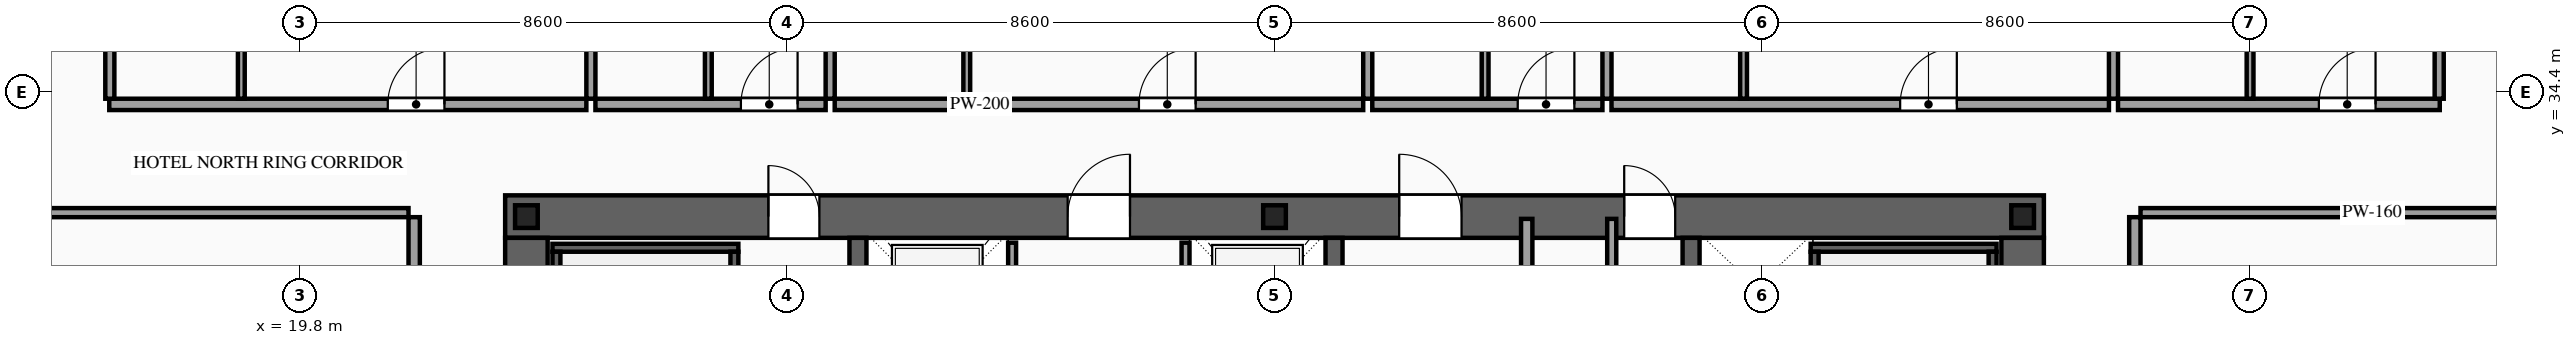
"""IFC4 building model, lengths in metres.
Left out: names, types, materials, properties, quantities, classifications, styles, units other than length and angle.
Written with IfcOpenShell. Run it as: python <this file> out.ifc"""

import sys

from ifc_helpers import new_model, si_unit, direction, frame, frame_2d, origin, origin_2d, place, context, subcontext, project, spatial, rectangle, i_section, extrude, source, transform, mapped, element, fill, save


model = new_model("IFC4")
c1 = context("Model", 3, precision=1e-05, world=origin(), true_north=direction((0.0, 1.0)))
c2 = subcontext(c1, "Body", "Model", "MODEL_VIEW")
j1 = project(units=[si_unit("LENGTHUNIT", "METRE"), si_unit("PLANEANGLEUNIT", "RADIAN")], contexts=[c1])
p1 = place(None, origin())
s1 = spatial("IfcSite", under=j1, at=p1, CompositionType="ELEMENT")
p2 = place(p1, origin())
s2 = spatial("IfcBuilding", under=s1, at=p2, CompositionType="ELEMENT")
p3 = place(p2, frame((0.0, 0.0, 145.2)))
s3 = spatial("IfcBuildingStorey", under=s2, at=p3, CompositionType="ELEMENT", Elevation=145.2)
p4 = place(p3, frame((23.425, 32.2, 0.0), z_axis=(0.0, 0.0, 1.0), x_axis=(1.0, 0.0, 0.0)))
e1 = element("IfcWall", 1, at=p4, inside=s3, PredefinedType="SHEAR", context=c2, shape_type="SweptSolid", body=[
    extrude(rectangle(XDim=27.15, YDim=0.75, at=frame_2d((13.575, 0.0))), origin(), (0.0, 0.0, 1.0), 3.6),
])
p5 = place(p4, frame((4.645, 0.0, 0.0)))
e2 = element("IfcOpeningElement", 2, at=p5, cuts=e1, PredefinedType="OPENING", context=c2, shape_type="SweptSolid", body=[
    extrude(rectangle(XDim=0.9, YDim=2.15, at=frame_2d((0.45, 1.075))), frame((0.0, 0.39, 0.0), z_axis=(0.0, -1.0, 0.0), x_axis=(1.0, 0.0, 0.0)), (0.0, 0.0, 1.0), 0.78),
])
p6 = place(p4, frame((9.925, 0.0, 0.0)))
e3 = element("IfcOpeningElement", 3, at=p6, cuts=e1, PredefinedType="OPENING", context=c2, shape_type="SweptSolid", body=[
    extrude(rectangle(XDim=1.1, YDim=2.2, at=frame_2d((0.55, 1.1))), frame((0.0, 0.39, 0.0), z_axis=(0.0, -1.0, 0.0), x_axis=(1.0, 0.0, 0.0)), (0.0, 0.0, 1.0), 0.78),
])
p7 = place(p4, frame((15.775, 0.0, 0.0)))
e4 = element("IfcOpeningElement", 4, at=p7, cuts=e1, PredefinedType="OPENING", context=c2, shape_type="SweptSolid", body=[
    extrude(rectangle(XDim=1.1, YDim=2.2, at=frame_2d((0.55, 1.1))), frame((0.0, 0.39, 0.0), z_axis=(0.0, -1.0, 0.0), x_axis=(1.0, 0.0, 0.0)), (0.0, 0.0, 1.0), 0.78),
])
p8 = place(p4, frame((19.745, 0.0, 0.0)))
e5 = element("IfcOpeningElement", 5, at=p8, cuts=e1, PredefinedType="OPENING", context=c2, shape_type="SweptSolid", body=[
    extrude(rectangle(XDim=0.9, YDim=2.15, at=frame_2d((0.45, 1.075))), frame((0.0, 0.39, 0.0), z_axis=(0.0, -1.0, 0.0), x_axis=(1.0, 0.0, 0.0)), (0.0, 0.0, 1.0), 0.78),
])
m1 = source(origin(), c2, "Body", "SweptSolid", [
    extrude(rectangle(XDim=12.05, YDim=0.75, at=frame_2d((6.025, 0.0))), origin(), (0.0, 0.0, 1.0), 3.6),
])
for number, where, z_axis, x_axis in (
    (6, (23.8, 19.775, 0.0), (0.0, 0.0, 1.0), (0.0, 1.0, 0.0)),
    (7, (50.2, 19.775, 0.0), (0.0, 0.0, 1.0), (0.0, 1.0, 0.0)),
):
    element("IfcWall", number, at=place(p3, frame(where, z_axis=z_axis, x_axis=x_axis)), inside=s3, PredefinedType="SHEAR", context=c2, shape_type="MappedRepresentation", body=[
        mapped(m1, transform((0.0, 0.0, 0.0), scale=1.0)),
    ])
m2 = source(origin(), c2, "Body", "SweptSolid", [
    extrude(rectangle(XDim=12.05, YDim=0.3, at=frame_2d((6.025, 0.0))), origin(), (0.0, 0.0, 1.0), 3.6),
])
for number, where, z_axis, x_axis in (
    (8, (29.65, 19.775, 0.0), (0.0, 0.0, 1.0), (0.0, 1.0, 0.0)),
    (9, (38.05, 19.775, 0.0), (0.0, 0.0, 1.0), (0.0, 1.0, 0.0)),
    (10, (44.35, 19.775, 0.0), (0.0, 0.0, 1.0), (0.0, 1.0, 0.0)),
):
    element("IfcWall", number, at=place(p3, frame(where, z_axis=z_axis, x_axis=x_axis)), inside=s3, PredefinedType="SOLIDWALL", context=c2, shape_type="MappedRepresentation", body=[
        mapped(m2, transform((0.0, 0.0, 0.0), scale=1.0)),
    ])
m3 = source(origin(), c2, "Body", "SweptSolid", [
    extrude(i_section(OverallWidth=0.4, OverallDepth=0.4, WebThickness=0.013, FlangeThickness=0.021, at=origin_2d()), origin(), (0.0, 0.0, 1.0), 3.6),
])
for number, where, z_axis, x_axis in (
    (11, (23.8, 32.2, 0.0), (0.0, 0.0, 1.0), (1.0, 0.0, 0.0)),
    (12, (37.0, 32.2, 0.0), (0.0, 0.0, 1.0), (1.0, 0.0, 0.0)),
    (13, (50.2, 32.2, 0.0), (0.0, 0.0, 1.0), (1.0, 0.0, 0.0)),
):
    element("IfcColumn", number, at=place(p3, frame(where, z_axis=z_axis, x_axis=x_axis)), inside=s3, PredefinedType="COLUMN", context=c2, shape_type="MappedRepresentation", body=[
        mapped(m3, transform((0.0, 0.0, 0.0), scale=1.0)),
    ])
p9 = place(p3, frame((32.37, 29.4, 0.0), z_axis=(0.0, 0.0, 1.0), x_axis=(0.0, 1.0, 0.0)))
e14 = element("IfcWall", 14, at=p9, inside=s3, PredefinedType="SOLIDWALL", context=c2, shape_type="SweptSolid", body=[
    extrude(rectangle(XDim=2.34, YDim=0.14, at=frame_2d((1.17, 0.0))), origin(), (0.0, 0.0, 1.0), 3.38),
])
p10 = place(p9, frame((0.62, 0.0, 0.0)))
e15 = element("IfcOpeningElement", 15, at=p10, cuts=e14, PredefinedType="OPENING", context=c2, shape_type="SweptSolid", body=[
    extrude(rectangle(XDim=1.1, YDim=2.2, at=frame_2d((0.55, 1.1))), frame((0.0, 0.085, 0.0), z_axis=(0.0, -1.0, 0.0), x_axis=(1.0, 0.0, 0.0)), (0.0, 0.0, 1.0), 0.17),
])
p11 = place(p3, frame((35.43, 29.4, 0.0), z_axis=(0.0, 0.0, 1.0), x_axis=(0.0, 1.0, 0.0)))
e16 = element("IfcWall", 16, at=p11, inside=s3, PredefinedType="SOLIDWALL", context=c2, shape_type="SweptSolid", body=[
    extrude(rectangle(XDim=2.34, YDim=0.14, at=frame_2d((1.17, 0.0))), origin(), (0.0, 0.0, 1.0), 3.38),
])
p12 = place(p11, frame((0.62, 0.0, 0.0)))
e17 = element("IfcOpeningElement", 17, at=p12, cuts=e16, PredefinedType="OPENING", context=c2, shape_type="SweptSolid", body=[
    extrude(rectangle(XDim=1.1, YDim=2.2, at=frame_2d((0.55, 1.1))), frame((0.0, 0.085, 0.0), z_axis=(0.0, -1.0, 0.0), x_axis=(1.0, 0.0, 0.0)), (0.0, 0.0, 1.0), 0.17),
])
m4 = source(origin(), c2, "Body", "SweptSolid", [
    extrude(rectangle(XDim=3.28, YDim=0.14, at=frame_2d((1.64, 0.0))), origin(), (0.0, 0.0, 1.0), 3.38),
])
p13 = place(p3, frame((24.26, 31.65, 0.0), z_axis=(0.0, 0.0, 1.0), x_axis=(1.0, 0.0, 0.0)))
e18 = element("IfcWall", 18, at=p13, inside=s3, PredefinedType="SOLIDWALL", context=c2, shape_type="MappedRepresentation", body=[
    mapped(m4, transform((0.0, 0.0, 0.0), scale=1.0)),
])
m5 = source(origin(), c2, "Body", "SweptSolid", [
    extrude(rectangle(XDim=8.94, YDim=0.14, at=frame_2d((4.47, 0.0))), origin(), (0.0, 0.0, 1.0), 3.38),
])
for number, where, z_axis, x_axis in (
    (19, (24.33, 22.64, 0.0), (0.0, 0.0, 1.0), (0.0, 1.0, 0.0)),
    (20, (27.47, 22.64, 0.0), (0.0, 0.0, 1.0), (0.0, 1.0, 0.0)),
):
    element("IfcWall", number, at=place(p3, frame(where, z_axis=z_axis, x_axis=x_axis)), inside=s3, PredefinedType="SOLIDWALL", context=c2, shape_type="MappedRepresentation", body=[
        mapped(m5, transform((0.0, 0.0, 0.0), scale=1.0)),
    ])
p14 = place(p3, frame((46.46, 31.65, 0.0), z_axis=(0.0, 0.0, 1.0), x_axis=(1.0, 0.0, 0.0)))
e21 = element("IfcWall", 21, at=p14, inside=s3, PredefinedType="SOLIDWALL", context=c2, shape_type="MappedRepresentation", body=[
    mapped(m4, transform((0.0, 0.0, 0.0), scale=1.0)),
])
for number, where, z_axis, x_axis in (
    (22, (46.53, 22.64, 0.0), (0.0, 0.0, 1.0), (0.0, 1.0, 0.0)),
    (23, (49.67, 22.64, 0.0), (0.0, 0.0, 1.0), (0.0, 1.0, 0.0)),
):
    element("IfcWall", number, at=place(p3, frame(where, z_axis=z_axis, x_axis=x_axis)), inside=s3, PredefinedType="SOLIDWALL", context=c2, shape_type="MappedRepresentation", body=[
        mapped(m5, transform((0.0, 0.0, 0.0), scale=1.0)),
    ])
m6 = source(origin(), c2, "Body", "SweptSolid", [
    extrude(rectangle(XDim=12.72, YDim=0.2, at=frame_2d((6.36, 0.0))), origin(), (0.0, 0.0, 1.0), 3.38),
])
p15 = place(p3, frame((41.45, 19.44, 0.0), z_axis=(0.0, 0.0, 1.0), x_axis=(0.0, 1.0, 0.0)))
e24 = element("IfcWall", 24, at=p15, inside=s3, PredefinedType="PARTITIONING", context=c2, shape_type="MappedRepresentation", body=[
    mapped(m6, transform((0.0, 0.0, 0.0), scale=1.0)),
])
m7 = source(origin(), c2, "Body", "SweptSolid", [
    extrude(rectangle(XDim=10.72, YDim=0.16, at=frame_2d((5.36, 0.0))), origin(), (0.0, 0.0, 1.0), 3.38),
])
p16 = place(p3, frame((42.95, 21.44, 0.0), z_axis=(0.0, 0.0, 1.0), x_axis=(0.0, 1.0, 0.0)))
e25 = element("IfcWall", 25, at=p16, inside=s3, PredefinedType="PARTITIONING", context=c2, shape_type="MappedRepresentation", body=[
    mapped(m7, transform((0.0, 0.0, 0.0), scale=1.0)),
])
p17 = place(p3, frame((16.44, 34.18, 0.0), z_axis=(0.0, 0.0, 1.0), x_axis=(1.0, 0.0, 0.0)))
e26 = element("IfcWall", 26, at=p17, inside=s3, PredefinedType="PARTITIONING", context=c2, shape_type="SweptSolid", body=[
    extrude(rectangle(XDim=8.418, YDim=0.2, at=frame_2d((4.209, 0.0))), origin(), (0.0, 0.0, 1.0), 3.38),
])
p18 = place(p17, frame((4.914, 0.0, 0.0)))
e27 = element("IfcOpeningElement", 27, at=p18, cuts=e26, PredefinedType="OPENING", context=c2, shape_type="SweptSolid", body=[
    extrude(rectangle(XDim=1.0, YDim=2.2, at=frame_2d((0.5, 1.1))), frame((0.0, 0.115, 0.0), z_axis=(0.0, -1.0, 0.0), x_axis=(1.0, 0.0, 0.0)), (0.0, 0.0, 1.0), 0.23),
])
m8 = source(origin(), c2, "Body", "SweptSolid", [
    extrude(rectangle(XDim=14.97, YDim=0.16, at=frame_2d((7.485, 0.0))), origin(), (0.0, 0.0, 1.0), 3.38),
])
p19 = place(p3, frame((24.938, 34.28, 0.0), z_axis=(0.0, 0.0, 1.0), x_axis=(0.0, 1.0, 0.0)))
e28 = element("IfcWall", 28, at=p19, inside=s3, PredefinedType="PARTITIONING", context=c2, shape_type="MappedRepresentation", body=[
    mapped(m8, transform((0.0, 0.0, 0.0), scale=1.0)),
])
m9 = source(origin(), c2, "Body", "SweptSolid", [
    extrude(rectangle(XDim=2.42, YDim=0.12, at=frame_2d((1.21, 0.0))), origin(), (0.0, 0.0, 1.0), 3.38),
])
p20 = place(p3, frame((18.77, 34.28, 0.0), z_axis=(0.0, 0.0, 1.0), x_axis=(0.0, 1.0, 0.0)))
e29 = element("IfcWall", 29, at=p20, inside=s3, PredefinedType="PARTITIONING", context=c2, shape_type="MappedRepresentation", body=[
    mapped(m9, transform((0.0, 0.0, 0.0), scale=1.0)),
])
p21 = place(p3, frame((25.018, 34.18, 0.0), z_axis=(0.0, 0.0, 1.0), x_axis=(1.0, 0.0, 0.0)))
e30 = element("IfcWall", 30, at=p21, inside=s3, PredefinedType="PARTITIONING", context=c2, shape_type="SweptSolid", body=[
    extrude(rectangle(XDim=4.062, YDim=0.2, at=frame_2d((2.031, 0.0))), origin(), (0.0, 0.0, 1.0), 3.38),
])
p22 = place(p21, frame((2.567, 0.0, 0.0)))
e31 = element("IfcOpeningElement", 31, at=p22, cuts=e30, PredefinedType="OPENING", context=c2, shape_type="SweptSolid", body=[
    extrude(rectangle(XDim=1.0, YDim=2.2, at=frame_2d((0.5, 1.1))), frame((0.0, 0.115, 0.0), z_axis=(0.0, -1.0, 0.0), x_axis=(1.0, 0.0, 0.0)), (0.0, 0.0, 1.0), 0.23),
])
p23 = place(p3, frame((29.16, 34.28, 0.0), z_axis=(0.0, 0.0, 1.0), x_axis=(0.0, 1.0, 0.0)))
e32 = element("IfcWall", 32, at=p23, inside=s3, PredefinedType="PARTITIONING", context=c2, shape_type="MappedRepresentation", body=[
    mapped(m8, transform((0.0, 0.0, 0.0), scale=1.0)),
])
p24 = place(p3, frame((27.01, 34.28, 0.0), z_axis=(0.0, 0.0, 1.0), x_axis=(0.0, 1.0, 0.0)))
e33 = element("IfcWall", 33, at=p24, inside=s3, PredefinedType="PARTITIONING", context=c2, shape_type="MappedRepresentation", body=[
    mapped(m9, transform((0.0, 0.0, 0.0), scale=1.0)),
])
p25 = place(p3, frame((29.24, 34.18, 0.0), z_axis=(0.0, 0.0, 1.0), x_axis=(1.0, 0.0, 0.0)))
e34 = element("IfcWall", 34, at=p25, inside=s3, PredefinedType="PARTITIONING", context=c2, shape_type="SweptSolid", body=[
    extrude(rectangle(XDim=9.325, YDim=0.2, at=frame_2d((4.663, 0.0))), origin(), (0.0, 0.0, 1.0), 3.38),
])
p26 = place(p25, frame((5.368, 0.0, 0.0)))
e35 = element("IfcOpeningElement", 35, at=p26, cuts=e34, PredefinedType="OPENING", context=c2, shape_type="SweptSolid", body=[
    extrude(rectangle(XDim=1.0, YDim=2.2, at=frame_2d((0.5, 1.1))), frame((0.0, 0.115, 0.0), z_axis=(0.0, -1.0, 0.0), x_axis=(1.0, 0.0, 0.0)), (0.0, 0.0, 1.0), 0.23),
])
p27 = place(p3, frame((38.645, 34.28, 0.0), z_axis=(0.0, 0.0, 1.0), x_axis=(0.0, 1.0, 0.0)))
e36 = element("IfcWall", 36, at=p27, inside=s3, PredefinedType="PARTITIONING", context=c2, shape_type="MappedRepresentation", body=[
    mapped(m8, transform((0.0, 0.0, 0.0), scale=1.0)),
])
p28 = place(p3, frame((31.57, 34.28, 0.0), z_axis=(0.0, 0.0, 1.0), x_axis=(0.0, 1.0, 0.0)))
e37 = element("IfcWall", 37, at=p28, inside=s3, PredefinedType="PARTITIONING", context=c2, shape_type="MappedRepresentation", body=[
    mapped(m9, transform((0.0, 0.0, 0.0), scale=1.0)),
])
p29 = place(p3, frame((38.725, 34.18, 0.0), z_axis=(0.0, 0.0, 1.0), x_axis=(1.0, 0.0, 0.0)))
e38 = element("IfcWall", 38, at=p29, inside=s3, PredefinedType="PARTITIONING", context=c2, shape_type="SweptSolid", body=[
    extrude(rectangle(XDim=4.061, YDim=0.2, at=frame_2d((2.03, 0.0))), origin(), (0.0, 0.0, 1.0), 3.38),
])
p30 = place(p29, frame((2.566, 0.0, 0.0)))
e39 = element("IfcOpeningElement", 39, at=p30, cuts=e38, PredefinedType="OPENING", context=c2, shape_type="SweptSolid", body=[
    extrude(rectangle(XDim=1.0, YDim=2.2, at=frame_2d((0.5, 1.1))), frame((0.0, 0.115, 0.0), z_axis=(0.0, -1.0, 0.0), x_axis=(1.0, 0.0, 0.0)), (0.0, 0.0, 1.0), 0.23),
])
p31 = place(p3, frame((42.866, 34.28, 0.0), z_axis=(0.0, 0.0, 1.0), x_axis=(0.0, 1.0, 0.0)))
e40 = element("IfcWall", 40, at=p31, inside=s3, PredefinedType="PARTITIONING", context=c2, shape_type="MappedRepresentation", body=[
    mapped(m8, transform((0.0, 0.0, 0.0), scale=1.0)),
])
p32 = place(p3, frame((40.716, 34.28, 0.0), z_axis=(0.0, 0.0, 1.0), x_axis=(0.0, 1.0, 0.0)))
e41 = element("IfcWall", 41, at=p32, inside=s3, PredefinedType="PARTITIONING", context=c2, shape_type="MappedRepresentation", body=[
    mapped(m9, transform((0.0, 0.0, 0.0), scale=1.0)),
])
p33 = place(p3, frame((42.946, 34.18, 0.0), z_axis=(0.0, 0.0, 1.0), x_axis=(1.0, 0.0, 0.0)))
e42 = element("IfcWall", 42, at=p33, inside=s3, PredefinedType="PARTITIONING", context=c2, shape_type="SweptSolid", body=[
    extrude(rectangle(XDim=8.777, YDim=0.2, at=frame_2d((4.388, 0.0))), origin(), (0.0, 0.0, 1.0), 3.38),
])
p34 = place(p33, frame((5.093, 0.0, 0.0)))
e43 = element("IfcOpeningElement", 43, at=p34, cuts=e42, PredefinedType="OPENING", context=c2, shape_type="SweptSolid", body=[
    extrude(rectangle(XDim=1.0, YDim=2.2, at=frame_2d((0.5, 1.1))), frame((0.0, 0.115, 0.0), z_axis=(0.0, -1.0, 0.0), x_axis=(1.0, 0.0, 0.0)), (0.0, 0.0, 1.0), 0.23),
])
p35 = place(p3, frame((51.803, 34.28, 0.0), z_axis=(0.0, 0.0, 1.0), x_axis=(0.0, 1.0, 0.0)))
e44 = element("IfcWall", 44, at=p35, inside=s3, PredefinedType="PARTITIONING", context=c2, shape_type="MappedRepresentation", body=[
    mapped(m8, transform((0.0, 0.0, 0.0), scale=1.0)),
])
p36 = place(p3, frame((45.276, 34.28, 0.0), z_axis=(0.0, 0.0, 1.0), x_axis=(0.0, 1.0, 0.0)))
e45 = element("IfcWall", 45, at=p36, inside=s3, PredefinedType="PARTITIONING", context=c2, shape_type="MappedRepresentation", body=[
    mapped(m9, transform((0.0, 0.0, 0.0), scale=1.0)),
])
p37 = place(p3, frame((51.883, 34.18, 0.0), z_axis=(0.0, 0.0, 1.0), x_axis=(1.0, 0.0, 0.0)))
e46 = element("IfcWall", 46, at=p37, inside=s3, PredefinedType="PARTITIONING", context=c2, shape_type="SweptSolid", body=[
    extrude(rectangle(XDim=5.677, YDim=0.2, at=frame_2d((2.838, 0.0))), origin(), (0.0, 0.0, 1.0), 3.38),
])
p38 = place(p37, frame((3.544, 0.0, 0.0)))
e47 = element("IfcOpeningElement", 47, at=p38, cuts=e46, PredefinedType="OPENING", context=c2, shape_type="SweptSolid", body=[
    extrude(rectangle(XDim=1.0, YDim=2.2, at=frame_2d((0.5, 1.1))), frame((0.0, 0.115, 0.0), z_axis=(0.0, -1.0, 0.0), x_axis=(1.0, 0.0, 0.0)), (0.0, 0.0, 1.0), 0.23),
])
m10 = source(origin(), c2, "Body", "SweptSolid", [
    extrude(rectangle(XDim=14.82, YDim=0.16, at=frame_2d((7.41, 0.0))), origin(), (0.0, 0.0, 1.0), 3.38),
])
for number, where, z_axis, x_axis in (
    (48, (16.45, 34.28, 0.0), (0.0, 0.0, 1.0), (0.0, 1.0, 0.0)),
    (49, (57.55, 34.28, 0.0), (0.0, 0.0, 1.0), (0.0, 1.0, 0.0)),
):
    element("IfcWall", number, at=place(p3, frame(where, z_axis=z_axis, x_axis=x_axis)), inside=s3, PredefinedType="PARTITIONING", context=c2, shape_type="MappedRepresentation", body=[
        mapped(m10, transform((0.0, 0.0, 0.0), scale=1.0)),
    ])
p39 = place(p3, frame((54.213, 34.28, 0.0), z_axis=(0.0, 0.0, 1.0), x_axis=(0.0, 1.0, 0.0)))
e50 = element("IfcWall", 50, at=p39, inside=s3, PredefinedType="PARTITIONING", context=c2, shape_type="MappedRepresentation", body=[
    mapped(m9, transform((0.0, 0.0, 0.0), scale=1.0)),
])
p40 = place(p3, frame((21.82, 25.88, 0.0), z_axis=(0.0, 0.0, 1.0), x_axis=(0.0, 1.0, 0.0)))
e51 = element("IfcWall", 51, at=p40, inside=s3, PredefinedType="PARTITIONING", context=c2, shape_type="SweptSolid", body=[
    extrude(rectangle(XDim=6.31, YDim=0.2, at=frame_2d((3.155, 0.0))), origin(), (0.0, 0.0, 1.0), 3.38),
])
p41 = place(p40, frame((2.655, 0.0, 0.0)))
e52 = element("IfcOpeningElement", 52, at=p41, cuts=e51, PredefinedType="OPENING", context=c2, shape_type="SweptSolid", body=[
    extrude(rectangle(XDim=1.0, YDim=2.2, at=frame_2d((0.5, 1.1))), frame((0.0, 0.115, 0.0), z_axis=(0.0, -1.0, 0.0), x_axis=(1.0, 0.0, 0.0)), (0.0, 0.0, 1.0), 0.23),
])
m11 = source(origin(), c2, "Body", "SweptSolid", [
    extrude(rectangle(XDim=8.17, YDim=0.16, at=frame_2d((4.085, 0.0))), origin(), (0.0, 0.0, 1.0), 2.875),
])
p42 = place(p3, frame((13.55, 32.27, 0.0), z_axis=(0.0, 0.0, 1.0), x_axis=(1.0, 0.0, 0.0)))
e53 = element("IfcWall", 53, at=p42, inside=s3, PredefinedType="PARTITIONING", context=c2, shape_type="MappedRepresentation", body=[
    mapped(m11, transform((0.0, 0.0, 0.0), scale=1.0)),
])
p43 = place(p3, frame((52.18, 25.88, 0.0), z_axis=(0.0, 0.0, 1.0), x_axis=(0.0, 1.0, 0.0)))
e54 = element("IfcWall", 54, at=p43, inside=s3, PredefinedType="PARTITIONING", context=c2, shape_type="SweptSolid", body=[
    extrude(rectangle(XDim=6.31, YDim=0.2, at=frame_2d((3.155, 0.0))), origin(), (0.0, 0.0, 1.0), 3.38),
])
p44 = place(p43, frame((3.835, 0.0, 0.0)))
e55 = element("IfcOpeningElement", 55, at=p44, cuts=e54, PredefinedType="OPENING", context=c2, shape_type="SweptSolid", body=[
    extrude(rectangle(XDim=1.0, YDim=2.2, at=frame_2d((0.5, 1.1))), frame((0.0, 0.115, 0.0), z_axis=(0.0, -1.0, 0.0), x_axis=(1.0, 0.0, 0.0)), (0.0, 0.0, 1.0), 0.23),
])
p45 = place(p3, frame((52.28, 32.27, 0.0), z_axis=(0.0, 0.0, 1.0), x_axis=(1.0, 0.0, 0.0)))
e56 = element("IfcWall", 56, at=p45, inside=s3, PredefinedType="PARTITIONING", context=c2, shape_type="MappedRepresentation", body=[
    mapped(m11, transform((0.0, 0.0, 0.0), scale=1.0)),
])
m12 = source(origin(), c2, "Body", "SweptSolid", [
    extrude(rectangle(XDim=0.9, YDim=2.15, at=frame_2d((0.45, 1.075))), frame((0.0, 0.025, 0.0), z_axis=(0.0, -1.0, 0.0), x_axis=(1.0, 0.0, 0.0)), (0.0, 0.0, 1.0), 0.05),
])
p46 = place(p5, origin())
e57 = element("IfcDoor", 57, at=p46, inside=s3, OperationType="SINGLE_SWING_LEFT", PredefinedType="DOOR", context=c2, shape_type="MappedRepresentation", body=[
    mapped(m12, transform((0.0, 0.0, 0.0), scale=1.0)),
])
fill(e2, e57)
m13 = source(origin(), c2, "Body", "SweptSolid", [
    extrude(rectangle(XDim=1.1, YDim=2.2, at=frame_2d((0.55, 1.1))), frame((0.0, 0.025, 0.0), z_axis=(0.0, -1.0, 0.0), x_axis=(1.0, 0.0, 0.0)), (0.0, 0.0, 1.0), 0.05),
])
p47 = place(p6, origin())
e58 = element("IfcDoor", 58, at=p47, inside=s3, OperationType="SINGLE_SWING_RIGHT", PredefinedType="DOOR", context=c2, shape_type="MappedRepresentation", body=[
    mapped(m13, transform((0.0, 0.0, 0.0), scale=1.0)),
])
fill(e3, e58)
p48 = place(p7, origin())
e59 = element("IfcDoor", 59, at=p48, inside=s3, OperationType="SINGLE_SWING_LEFT", PredefinedType="DOOR", context=c2, shape_type="MappedRepresentation", body=[
    mapped(m13, transform((0.0, 0.0, 0.0), scale=1.0)),
])
fill(e4, e59)
p49 = place(p8, origin())
e60 = element("IfcDoor", 60, at=p49, inside=s3, OperationType="SINGLE_SWING_LEFT", PredefinedType="DOOR", context=c2, shape_type="MappedRepresentation", body=[
    mapped(m12, transform((0.0, 0.0, 0.0), scale=1.0)),
])
fill(e5, e60)
m14 = source(origin(), c2, "Body", "SweptSolid", [
    extrude(rectangle(XDim=1.0, YDim=2.2, at=frame_2d((0.5, 1.1))), frame((0.0, 0.025, 0.0), z_axis=(0.0, -1.0, 0.0), x_axis=(1.0, 0.0, 0.0)), (0.0, 0.0, 1.0), 0.05),
])
p50 = place(p18, origin())
e61 = element("IfcDoor", 61, at=p50, inside=s3, OperationType="SINGLE_SWING_RIGHT", PredefinedType="DOOR", context=c2, shape_type="MappedRepresentation", body=[
    mapped(m14, transform((0.0, 0.0, 0.0), scale=1.0)),
])
fill(e27, e61)
p51 = place(p22, origin())
e62 = element("IfcDoor", 62, at=p51, inside=s3, OperationType="SINGLE_SWING_RIGHT", PredefinedType="DOOR", context=c2, shape_type="MappedRepresentation", body=[
    mapped(m14, transform((0.0, 0.0, 0.0), scale=1.0)),
])
fill(e31, e62)
p52 = place(p26, origin())
e63 = element("IfcDoor", 63, at=p52, inside=s3, OperationType="SINGLE_SWING_RIGHT", PredefinedType="DOOR", context=c2, shape_type="MappedRepresentation", body=[
    mapped(m14, transform((0.0, 0.0, 0.0), scale=1.0)),
])
fill(e35, e63)
p53 = place(p30, origin())
e64 = element("IfcDoor", 64, at=p53, inside=s3, OperationType="SINGLE_SWING_RIGHT", PredefinedType="DOOR", context=c2, shape_type="MappedRepresentation", body=[
    mapped(m14, transform((0.0, 0.0, 0.0), scale=1.0)),
])
fill(e39, e64)
p54 = place(p34, origin())
e65 = element("IfcDoor", 65, at=p54, inside=s3, OperationType="SINGLE_SWING_RIGHT", PredefinedType="DOOR", context=c2, shape_type="MappedRepresentation", body=[
    mapped(m14, transform((0.0, 0.0, 0.0), scale=1.0)),
])
fill(e43, e65)
p55 = place(p38, origin())
e66 = element("IfcDoor", 66, at=p55, inside=s3, OperationType="SINGLE_SWING_RIGHT", PredefinedType="DOOR", context=c2, shape_type="MappedRepresentation", body=[
    mapped(m14, transform((0.0, 0.0, 0.0), scale=1.0)),
])
fill(e47, e66)
save(model, sys.argv[1])
